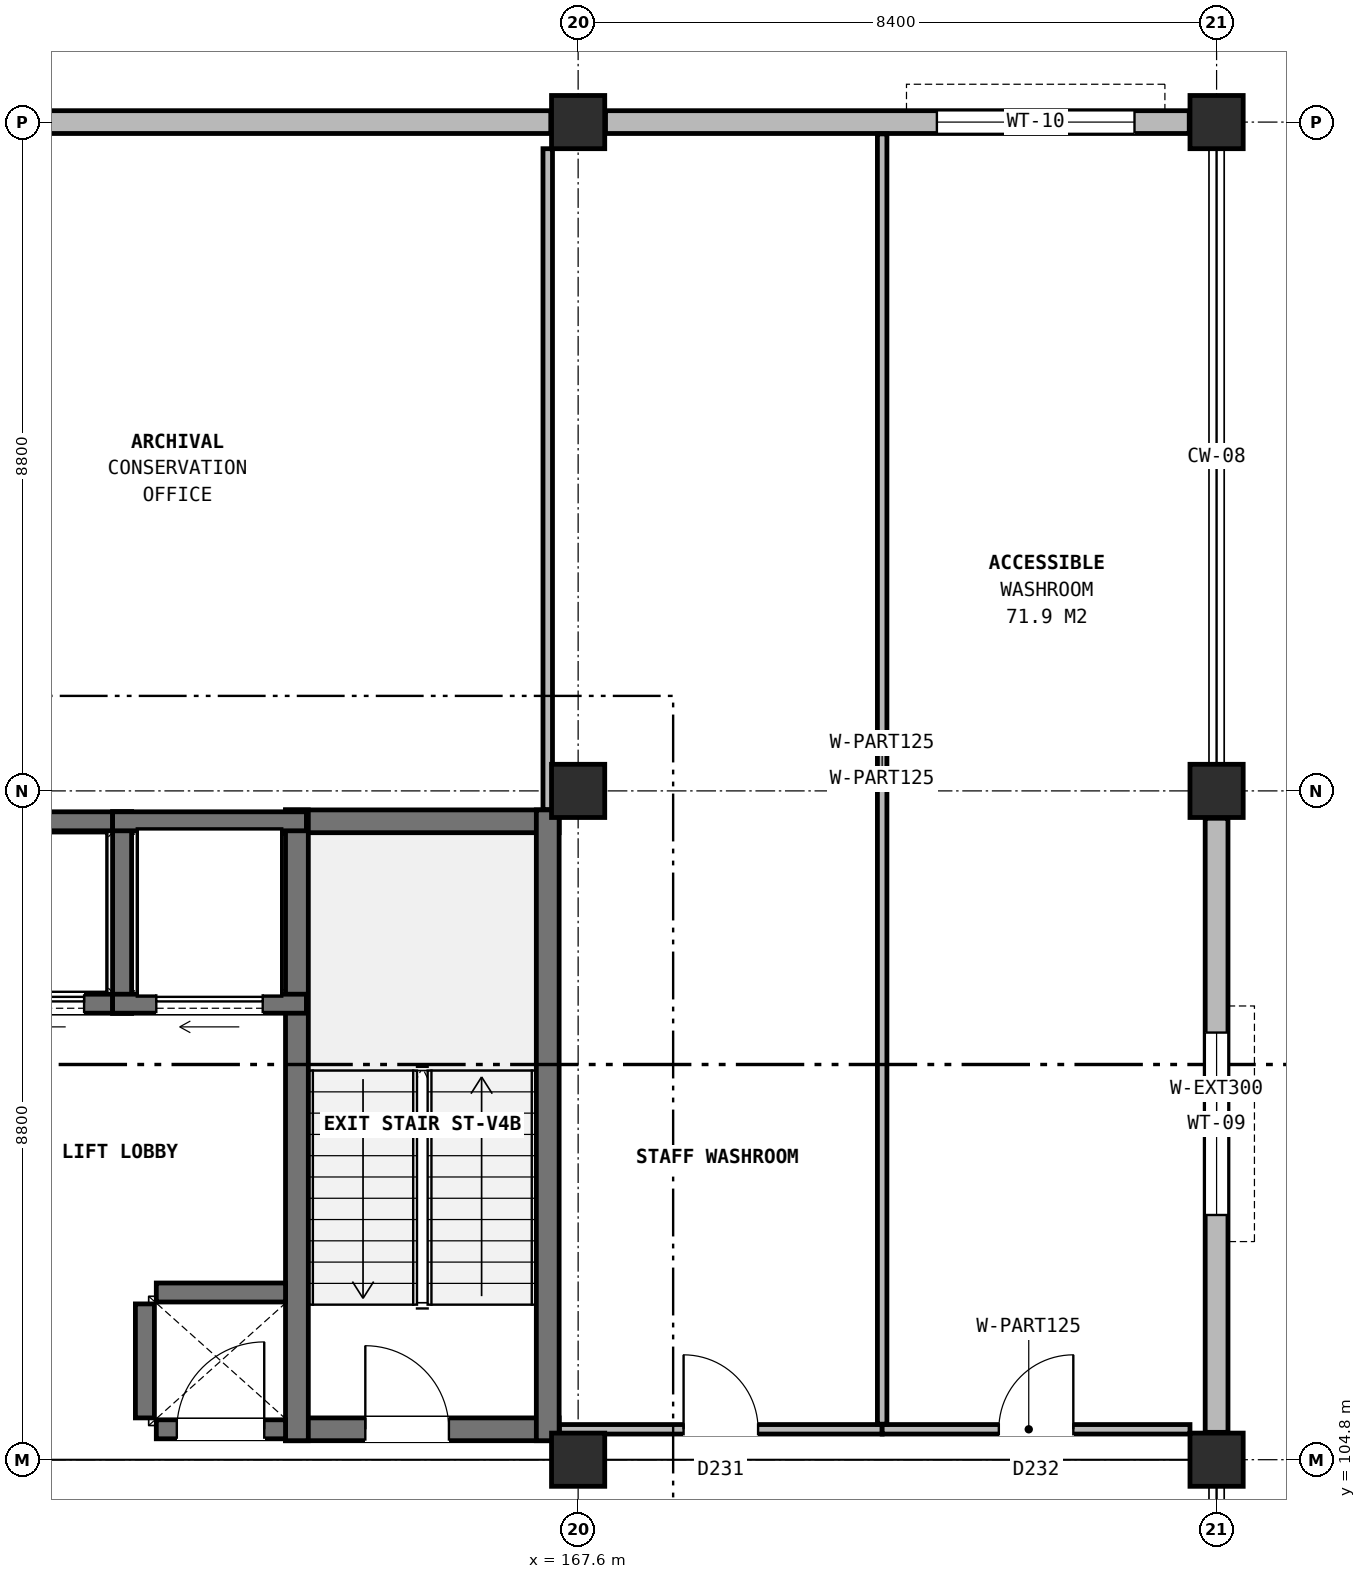
"""IFC4 building model, lengths in metres.
Left out: names, types, materials, properties, quantities, classifications, styles, units other than length and angle.
Written with IfcOpenShell. Run it as: python <this file> out.ifc"""

import sys

from ifc_helpers import new_model, si_unit, direction, frame, frame_2d, origin, origin_2d, place, context, subcontext, project, spatial, rectangle, extrude, element, fill, save


model = new_model("IFC4")
c1 = context("Model", 3, precision=1e-05, world=origin(), true_north=direction((0.0, 1.0)))
c2 = subcontext(c1, "Body", "Model", "MODEL_VIEW")
j1 = project(units=[si_unit("LENGTHUNIT", "METRE"), si_unit("PLANEANGLEUNIT", "RADIAN")], contexts=[c1])
p1 = place(None, origin())
s1 = spatial("IfcSite", under=j1, at=p1, CompositionType="ELEMENT")
p2 = place(p1, origin())
s2 = spatial("IfcBuilding", under=s1, at=p2, CompositionType="ELEMENT")
p3 = place(p2, frame((0.0, 0.0, 32.8)))
s3 = spatial("IfcBuildingStorey", under=s2, at=p3, CompositionType="ELEMENT", Elevation=32.8)
for number, where, z_axis, x_axis in (
    (1, (167.6, 104.8, 0.0), (0.0, 0.0, 1.0), (1.0, 0.0, 0.0)),
    (2, (167.6, 113.6, 0.0), (0.0, 0.0, 1.0), (1.0, 0.0, 0.0)),
    (3, (167.6, 122.4, 0.0), (0.0, 0.0, 1.0), (1.0, 0.0, 0.0)),
    (4, (176.0, 104.8, 0.0), (0.0, 0.0, 1.0), (1.0, 0.0, 0.0)),
    (5, (176.0, 113.6, 0.0), (0.0, 0.0, 1.0), (1.0, 0.0, 0.0)),
    (6, (176.0, 122.4, 0.0), (0.0, 0.0, 1.0), (1.0, 0.0, 0.0)),
):
    element("IfcColumn", number, at=place(p3, frame(where, z_axis=z_axis, x_axis=x_axis)), inside=s3, PredefinedType="COLUMN", context=c2, shape_type="SweptSolid", body=[
        extrude(rectangle(XDim=0.7, YDim=0.7, at=origin_2d()), origin(), (0.0, 0.0, 1.0), 4.0),
    ])
p4 = place(p3, frame((176.0, 105.16, 0.0), z_axis=(0.0, 0.0, 1.0), x_axis=(0.0, 1.0, 0.0)))
e7 = element("IfcWall", 7, at=p4, inside=s3, PredefinedType="SOLIDWALL", context=c2, shape_type="SweptSolid", body=[
    extrude(rectangle(XDim=8.08, YDim=0.3, at=frame_2d((4.04, 0.0))), origin(), (0.0, 0.0, 1.0), 3.25),
])
p5 = place(p4, frame((2.86, 0.0, 0.9)))
e8 = element("IfcOpeningElement", 8, at=p5, cuts=e7, PredefinedType="OPENING", context=c2, shape_type="SweptSolid", body=[
    extrude(rectangle(XDim=2.4, YDim=2.0, at=frame_2d((1.2, 1.0))), frame((0.0, 0.16, 0.0), z_axis=(0.0, -1.0, 0.0), x_axis=(1.0, 0.0, 0.0)), (0.0, 0.0, 1.0), 0.32),
])
p6 = place(p3, frame((175.64, 122.4, 0.0), z_axis=(0.0, 0.0, 1.0), x_axis=(-1.0, 0.0, 0.0)))
e9 = element("IfcWall", 9, at=p6, inside=s3, PredefinedType="SOLIDWALL", context=c2, shape_type="SweptSolid", body=[
    extrude(rectangle(XDim=7.68, YDim=0.3, at=frame_2d((3.84, 0.0))), origin(), (0.0, 0.0, 1.0), 3.25),
])
p7 = place(p6, frame((0.72, 0.0, 0.9)))
e10 = element("IfcOpeningElement", 10, at=p7, cuts=e9, PredefinedType="OPENING", context=c2, shape_type="SweptSolid", body=[
    extrude(rectangle(XDim=2.6, YDim=2.0, at=frame_2d((1.3, 1.0))), frame((0.0, 0.16, 0.0), z_axis=(0.0, -1.0, 0.0), x_axis=(1.0, 0.0, 0.0)), (0.0, 0.0, 1.0), 0.32),
])
p8 = place(p3, frame((167.24, 122.4, 0.0), z_axis=(0.0, 0.0, 1.0), x_axis=(-1.0, 0.0, 0.0)))
e11 = element("IfcWall", 11, at=p8, inside=s3, PredefinedType="SOLIDWALL", context=c2, shape_type="SweptSolid", body=[
    extrude(rectangle(XDim=7.68, YDim=0.3, at=frame_2d((3.84, 0.0))), origin(), (0.0, 0.0, 1.0), 3.25),
])
p9 = place(p3, frame((163.75, 105.2, 0.0), z_axis=(0.0, 0.0, 1.0), x_axis=(1.0, 0.0, 0.0)))
e12 = element("IfcWall", 12, at=p9, inside=s3, PredefinedType="SHEAR", context=c2, shape_type="SweptSolid", body=[
    extrude(rectangle(XDim=3.6, YDim=0.3, at=frame_2d((1.8, 0.0))), origin(), (0.0, 0.0, 1.0), 4.0),
])
p10 = place(p9, frame((1.05, 0.0, 0.0)))
e13 = element("IfcOpeningElement", 13, at=p10, cuts=e12, PredefinedType="OPENING", context=c2, shape_type="SweptSolid", body=[
    extrude(rectangle(XDim=1.1, YDim=2.2, at=frame_2d((0.55, 1.1))), frame((0.0, 0.16, 0.0), z_axis=(0.0, -1.0, 0.0), x_axis=(1.0, 0.0, 0.0)), (0.0, 0.0, 1.0), 0.32),
])
p11 = place(p3, frame((163.75, 113.2, 0.0), z_axis=(0.0, 0.0, 1.0), x_axis=(1.0, 0.0, 0.0)))
e14 = element("IfcWall", 14, at=p11, inside=s3, PredefinedType="SHEAR", context=c2, shape_type="SweptSolid", body=[
    extrude(rectangle(XDim=3.6, YDim=0.3, at=frame_2d((1.8, 0.0))), origin(), (0.0, 0.0, 1.0), 4.0),
])
for number, where, z_axis, x_axis in (
    (15, (163.9, 105.05, 0.0), (0.0, 0.0, 1.0), (0.0, 1.0, 0.0)),
    (16, (167.2, 105.05, 0.0), (0.0, 0.0, 1.0), (0.0, 1.0, 0.0)),
):
    element("IfcWall", number, at=place(p3, frame(where, z_axis=z_axis, x_axis=x_axis)), inside=s3, PredefinedType="SHEAR", context=c2, shape_type="SweptSolid", body=[
        extrude(rectangle(XDim=8.3, YDim=0.3, at=frame_2d((4.15, 0.0))), origin(), (0.0, 0.0, 1.0), 4.0),
    ])
p12 = place(p3, frame((159.375, 110.8, 0.0), z_axis=(0.0, 0.0, 1.0), x_axis=(1.0, 0.0, 0.0)))
e17 = element("IfcWall", 17, at=p12, inside=s3, PredefinedType="SOLIDWALL", context=c2, shape_type="SweptSolid", body=[
    extrude(rectangle(XDim=2.35, YDim=0.25, at=frame_2d((1.175, 0.0))), origin(), (0.0, 0.0, 1.0), 3.68),
])
p13 = place(p12, frame((0.625, 0.0, 0.0)))
e18 = element("IfcOpeningElement", 18, at=p13, cuts=e17, PredefinedType="OPENING", context=c2, shape_type="SweptSolid", body=[
    extrude(rectangle(XDim=1.1, YDim=2.2, at=frame_2d((0.55, 1.1))), frame((0.0, 0.135, 0.0), z_axis=(0.0, -1.0, 0.0), x_axis=(1.0, 0.0, 0.0)), (0.0, 0.0, 1.0), 0.27),
])
p14 = place(p3, frame((159.375, 113.2, 0.0), z_axis=(0.0, 0.0, 1.0), x_axis=(1.0, 0.0, 0.0)))
e19 = element("IfcWall", 19, at=p14, inside=s3, PredefinedType="SOLIDWALL", context=c2, shape_type="SweptSolid", body=[
    extrude(rectangle(XDim=2.35, YDim=0.25, at=frame_2d((1.175, 0.0))), origin(), (0.0, 0.0, 1.0), 3.68),
])
p15 = place(p3, frame((161.6, 110.675, 0.0), z_axis=(0.0, 0.0, 1.0), x_axis=(0.0, 1.0, 0.0)))
e20 = element("IfcWall", 20, at=p15, inside=s3, PredefinedType="SOLIDWALL", context=c2, shape_type="SweptSolid", body=[
    extrude(rectangle(XDim=2.65, YDim=0.25, at=frame_2d((1.325, 0.0))), origin(), (0.0, 0.0, 1.0), 3.68),
])
p16 = place(p3, frame((161.475, 110.8, 0.0), z_axis=(0.0, 0.0, 1.0), x_axis=(1.0, 0.0, 0.0)))
e21 = element("IfcWall", 21, at=p16, inside=s3, PredefinedType="SOLIDWALL", context=c2, shape_type="SweptSolid", body=[
    extrude(rectangle(XDim=2.55, YDim=0.25, at=frame_2d((1.275, 0.0))), origin(), (0.0, 0.0, 1.0), 3.68),
])
p17 = place(p16, frame((0.575, 0.0, 0.0)))
e22 = element("IfcOpeningElement", 22, at=p17, cuts=e21, PredefinedType="OPENING", context=c2, shape_type="SweptSolid", body=[
    extrude(rectangle(XDim=1.4, YDim=2.3, at=frame_2d((0.7, 1.15))), frame((0.0, 0.135, 0.0), z_axis=(0.0, -1.0, 0.0), x_axis=(1.0, 0.0, 0.0)), (0.0, 0.0, 1.0), 0.27),
])
p18 = place(p3, frame((161.475, 113.2, 0.0), z_axis=(0.0, 0.0, 1.0), x_axis=(1.0, 0.0, 0.0)))
e23 = element("IfcWall", 23, at=p18, inside=s3, PredefinedType="SOLIDWALL", context=c2, shape_type="SweptSolid", body=[
    extrude(rectangle(XDim=2.55, YDim=0.25, at=frame_2d((1.275, 0.0))), origin(), (0.0, 0.0, 1.0), 3.68),
])
p19 = place(p3, frame((161.9, 105.35, 0.0), z_axis=(0.0, 0.0, 1.0), x_axis=(0.0, 1.0, 0.0)))
e24 = element("IfcWall", 24, at=p19, inside=s3, PredefinedType="SOLIDWALL", context=c2, shape_type="SweptSolid", body=[
    extrude(rectangle(XDim=1.5, YDim=0.25, at=frame_2d((0.75, 0.0))), origin(), (0.0, 0.0, 1.0), 3.68),
])
p20 = place(p3, frame((162.05, 107.0, 0.0), z_axis=(0.0, 0.0, 1.0), x_axis=(1.0, 0.0, 0.0)))
e25 = element("IfcWall", 25, at=p20, inside=s3, PredefinedType="SOLIDWALL", context=c2, shape_type="SweptSolid", body=[
    extrude(rectangle(XDim=1.7, YDim=0.25, at=frame_2d((0.85, 0.0))), origin(), (0.0, 0.0, 1.0), 3.68),
])
p21 = place(p3, frame((162.05, 105.2, 0.0), z_axis=(0.0, 0.0, 1.0), x_axis=(1.0, 0.0, 0.0)))
e26 = element("IfcWall", 26, at=p21, inside=s3, PredefinedType="SOLIDWALL", context=c2, shape_type="SweptSolid", body=[
    extrude(rectangle(XDim=1.7, YDim=0.25, at=frame_2d((0.85, 0.0))), origin(), (0.0, 0.0, 1.0), 3.68),
])
p22 = place(p21, frame((0.27, 0.0, 0.0)))
e27 = element("IfcOpeningElement", 27, at=p22, cuts=e26, PredefinedType="OPENING", context=c2, shape_type="SweptSolid", body=[
    extrude(rectangle(XDim=1.15, YDim=2.2, at=frame_2d((0.575, 1.1))), frame((0.0, 0.135, 0.0), z_axis=(0.0, -1.0, 0.0), x_axis=(1.0, 0.0, 0.0)), (0.0, 0.0, 1.0), 0.27),
])
p23 = place(p3, frame((167.355, 105.2, 0.0), z_axis=(0.0, 0.0, 1.0), x_axis=(1.0, 0.0, 0.0)))
e28 = element("IfcWall", 28, at=p23, inside=s3, PredefinedType="PARTITIONING", context=c2, shape_type="SweptSolid", body=[
    extrude(rectangle(XDim=4.245, YDim=0.125, at=frame_2d((2.123, 0.0))), origin(), (0.0, 0.0, 1.0), 3.245),
])
p24 = place(p23, frame((1.633, 0.0, 0.0)))
e29 = element("IfcOpeningElement", 29, at=p24, cuts=e28, PredefinedType="OPENING", context=c2, shape_type="SweptSolid", body=[
    extrude(rectangle(XDim=0.98, YDim=2.1, at=frame_2d((0.49, 1.05))), frame((0.0, 0.073, 0.0), z_axis=(0.0, -1.0, 0.0), x_axis=(1.0, 0.0, 0.0)), (0.0, 0.0, 1.0), 0.145),
])
p25 = place(p3, frame((171.6, 105.2, 0.0), z_axis=(0.0, 0.0, 1.0), x_axis=(1.0, 0.0, 0.0)))
e30 = element("IfcWall", 30, at=p25, inside=s3, PredefinedType="PARTITIONING", context=c2, shape_type="SweptSolid", body=[
    extrude(rectangle(XDim=4.05, YDim=0.125, at=frame_2d((2.025, 0.0))), origin(), (0.0, 0.0, 1.0), 3.245),
])
p26 = place(p25, frame((1.535, 0.0, 0.0)))
e31 = element("IfcOpeningElement", 31, at=p26, cuts=e30, PredefinedType="OPENING", context=c2, shape_type="SweptSolid", body=[
    extrude(rectangle(XDim=0.98, YDim=2.1, at=frame_2d((0.49, 1.05))), frame((0.0, 0.073, 0.0), z_axis=(0.0, -1.0, 0.0), x_axis=(1.0, 0.0, 0.0)), (0.0, 0.0, 1.0), 0.145),
])
p27 = place(p3, frame((167.2, 113.355, 0.0), z_axis=(0.0, 0.0, 1.0), x_axis=(0.0, 1.0, 0.0)))
e32 = element("IfcWall", 32, at=p27, inside=s3, PredefinedType="PARTITIONING", context=c2, shape_type="SweptSolid", body=[
    extrude(rectangle(XDim=8.695, YDim=0.125, at=frame_2d((4.348, 0.0))), origin(), (0.0, 0.0, 1.0), 3.245),
])
p28 = place(p3, frame((171.6, 105.268, 0.0), z_axis=(0.0, 0.0, 1.0), x_axis=(0.0, 1.0, 0.0)))
e33 = element("IfcWall", 33, at=p28, inside=s3, PredefinedType="PARTITIONING", context=c2, shape_type="SweptSolid", body=[
    extrude(rectangle(XDim=16.978, YDim=0.125, at=frame_2d((8.489, 0.0))), origin(), (0.0, 0.0, 1.0), 3.665),
])
p29 = place(p5, origin())
e34 = element("IfcWindow", 34, at=p29, inside=s3, PartitioningType="SINGLE_PANEL", PredefinedType="WINDOW", context=c2, shape_type="SweptSolid", body=[
    extrude(rectangle(XDim=2.4, YDim=2.0, at=frame_2d((1.2, 1.0))), frame((0.0, 0.03, 0.0), z_axis=(0.0, -1.0, 0.0), x_axis=(1.0, 0.0, 0.0)), (0.0, 0.0, 1.0), 0.06),
])
fill(e8, e34)
p30 = place(p7, origin())
e35 = element("IfcWindow", 35, at=p30, inside=s3, PartitioningType="SINGLE_PANEL", PredefinedType="WINDOW", context=c2, shape_type="SweptSolid", body=[
    extrude(rectangle(XDim=2.6, YDim=2.0, at=frame_2d((1.3, 1.0))), frame((0.0, 0.03, 0.0), z_axis=(0.0, -1.0, 0.0), x_axis=(1.0, 0.0, 0.0)), (0.0, 0.0, 1.0), 0.06),
])
fill(e10, e35)
p31 = place(p10, origin())
e36 = element("IfcDoor", 36, at=p31, inside=s3, OperationType="SINGLE_SWING_LEFT", PredefinedType="DOOR", context=c2, shape_type="SweptSolid", body=[
    extrude(rectangle(XDim=1.1, YDim=2.2, at=frame_2d((0.55, 1.1))), frame((0.0, 0.025, 0.0), z_axis=(0.0, -1.0, 0.0), x_axis=(1.0, 0.0, 0.0)), (0.0, 0.0, 1.0), 0.05),
])
fill(e13, e36)
p32 = place(p13, origin())
e37 = element("IfcDoor", 37, at=p32, inside=s3, OperationType="SLIDING_TO_LEFT", PredefinedType="DOOR", context=c2, shape_type="SweptSolid", body=[
    extrude(rectangle(XDim=1.1, YDim=2.2, at=frame_2d((0.55, 1.1))), frame((0.0, 0.025, 0.0), z_axis=(0.0, -1.0, 0.0), x_axis=(1.0, 0.0, 0.0)), (0.0, 0.0, 1.0), 0.05),
])
fill(e18, e37)
p33 = place(p17, origin())
e38 = element("IfcDoor", 38, at=p33, inside=s3, OperationType="SLIDING_TO_LEFT", PredefinedType="DOOR", context=c2, shape_type="SweptSolid", body=[
    extrude(rectangle(XDim=1.4, YDim=2.3, at=frame_2d((0.7, 1.15))), frame((0.0, 0.025, 0.0), z_axis=(0.0, -1.0, 0.0), x_axis=(1.0, 0.0, 0.0)), (0.0, 0.0, 1.0), 0.05),
])
fill(e22, e38)
p34 = place(p22, origin())
e39 = element("IfcDoor", 39, at=p34, inside=s3, OperationType="SINGLE_SWING_RIGHT", PredefinedType="DOOR", context=c2, shape_type="SweptSolid", body=[
    extrude(rectangle(XDim=1.15, YDim=2.2, at=frame_2d((0.575, 1.1))), frame((0.0, 0.025, 0.0), z_axis=(0.0, -1.0, 0.0), x_axis=(1.0, 0.0, 0.0)), (0.0, 0.0, 1.0), 0.05),
])
fill(e27, e39)
p35 = place(p24, origin())
e40 = element("IfcDoor", 40, at=p35, inside=s3, OperationType="SINGLE_SWING_LEFT", PredefinedType="DOOR", context=c2, shape_type="SweptSolid", body=[
    extrude(rectangle(XDim=0.98, YDim=2.1, at=frame_2d((0.49, 1.05))), frame((0.0, 0.025, 0.0), z_axis=(0.0, -1.0, 0.0), x_axis=(1.0, 0.0, 0.0)), (0.0, 0.0, 1.0), 0.05),
])
fill(e29, e40)
p36 = place(p26, origin())
e41 = element("IfcDoor", 41, at=p36, inside=s3, OperationType="SINGLE_SWING_RIGHT", PredefinedType="DOOR", context=c2, shape_type="SweptSolid", body=[
    extrude(rectangle(XDim=0.98, YDim=2.1, at=frame_2d((0.49, 1.05))), frame((0.0, 0.025, 0.0), z_axis=(0.0, -1.0, 0.0), x_axis=(1.0, 0.0, 0.0)), (0.0, 0.0, 1.0), 0.05),
])
fill(e31, e41)
save(model, sys.argv[1])
